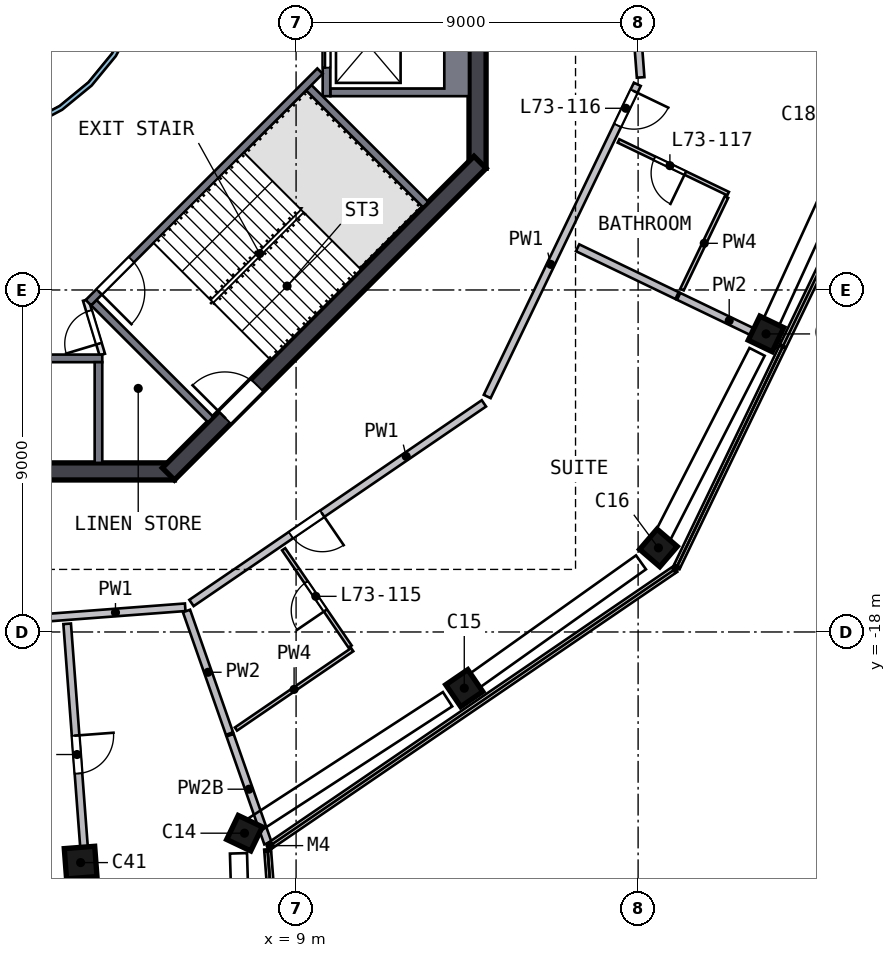
"""IFC4 building model, lengths in metres.
Left out: names, types, materials, properties, quantities, classifications, styles, units other than length and angle.
Written with IfcOpenShell. Run it as: python <this file> out.ifc"""

import sys

from ifc_helpers import new_model, si_unit, direction, frame, frame_2d, origin, origin_2d, place, context, subcontext, project, spatial, polyline, rectangle, outline, extrude, element, fill, save


model = new_model("IFC4")
c1 = context("Model", 3, precision=1e-05, world=origin(), true_north=direction((0.0, 1.0)))
c2 = subcontext(c1, "Body", "Model", "MODEL_VIEW")
j1 = project(units=[si_unit("LENGTHUNIT", "METRE"), si_unit("PLANEANGLEUNIT", "RADIAN")], contexts=[c1])
p1 = place(None, origin())
s1 = spatial("IfcSite", under=j1, at=p1, CompositionType="ELEMENT")
p2 = place(p1, origin())
s2 = spatial("IfcBuilding", under=s1, at=p2, CompositionType="ELEMENT")
p3 = place(p2, frame((0.0, 0.0, 295.0)))
s3 = spatial("IfcBuildingStorey", under=s2, at=p3, CompositionType="ELEMENT", Elevation=295.0)
p4 = place(p3, frame((7.539, -23.33, 0.0), z_axis=(0.086228285, 0.028723419, 0.995861259), x_axis=(-0.42819106, -0.901484173, 0.063076948)))
e1 = element("IfcColumn", 1, at=p4, inside=s3, PredefinedType="COLUMN", context=c2, shape_type="SweptSolid", body=[
    extrude(rectangle(XDim=0.7, YDim=0.7, at=origin_2d()), origin(), (0.0, 0.0, 1.0), 4.207),
])
p5 = place(p3, frame((13.339, -19.54, 0.0), z_axis=(0.072089807, 0.050091388, 0.996139505), x_axis=(0.822815086, 0.561488906, -0.087781218)))
e2 = element("IfcColumn", 2, at=p5, inside=s3, PredefinedType="COLUMN", context=c2, shape_type="SweptSolid", body=[
    extrude(rectangle(XDim=0.7, YDim=0.7, at=origin_2d()), origin(), (0.0, 0.0, 1.0), 4.206),
])
p6 = place(p3, frame((18.465, -15.871, 0.0), z_axis=(0.05826254, 0.068940137, 0.995918036), x_axis=(-0.649248608, -0.755201666, 0.090259013)))
e3 = element("IfcColumn", 3, at=p6, inside=s3, PredefinedType="COLUMN", context=c2, shape_type="SweptSolid", body=[
    extrude(rectangle(XDim=0.7, YDim=0.7, at=origin_2d()), origin(), (0.0, 0.0, 1.0), 4.207),
])
p7 = place(p3, frame((21.322, -10.252, 0.0), z_axis=(0.037379974, 0.079403422, 0.996141473), x_axis=(0.43187559, 0.897653527, -0.08775888)))
e4 = element("IfcColumn", 4, at=p7, inside=s3, PredefinedType="COLUMN", context=c2, shape_type="SweptSolid", body=[
    extrude(rectangle(XDim=0.7, YDim=0.7, at=origin_2d()), origin(), (0.0, 0.0, 1.0), 4.206),
])
p8 = place(p3, frame((3.223, -24.084, 0.0), z_axis=(0.089194109, 0.012708855, 0.995933178), x_axis=(0.075965993, -0.997092833, 0.005920266)))
e5 = element("IfcColumn", 5, at=p8, inside=s3, PredefinedType="COLUMN", context=c2, shape_type="SweptSolid", body=[
    extrude(rectangle(XDim=0.8, YDim=0.8, at=origin_2d()), origin(), (0.0, 0.0, 1.0), 4.207),
])
p9 = place(p3, frame((13.775, -5.799, 0.0), z_axis=(0.0, 0.0, 1.0), x_axis=(0.0, 1.0, 0.0)))
e6 = element("IfcWall", 6, at=p9, inside=s3, PredefinedType="SHEAR", context=c2, shape_type="SweptSolid", body=[
    extrude(rectangle(XDim=11.598, YDim=0.45, at=frame_2d((5.799, 0.0))), origin(), (0.0, 0.0, 1.0), 4.5),
])
p10 = place(p9, frame((4.899, 0.0, 0.0)))
e7 = element("IfcOpeningElement", 7, at=p10, cuts=e6, PredefinedType="OPENING", context=c2, shape_type="SweptSolid", body=[
    extrude(rectangle(XDim=1.8, YDim=2.1, at=frame_2d((0.9, 1.05))), frame((0.0, 0.235, 0.0), z_axis=(0.0, -1.0, 0.0), x_axis=(1.0, 0.0, 0.0)), (0.0, 0.0, 1.0), 0.47),
])
p11 = place(p3, frame((-5.799, -13.775, 0.0), z_axis=(0.0, 0.0, 1.0), x_axis=(1.0, 0.0, 0.0)))
e8 = element("IfcWall", 8, at=p11, inside=s3, PredefinedType="SHEAR", context=c2, shape_type="SweptSolid", body=[
    extrude(rectangle(XDim=11.598, YDim=0.45, at=frame_2d((5.799, 0.0))), origin(), (0.0, 0.0, 1.0), 4.5),
])
p12 = place(p3, frame((5.64, -13.841, 0.0), z_axis=(0.0, 0.0, 1.0), x_axis=(0.707106781, 0.707106781, 0.0)))
e9 = element("IfcWall", 9, at=p12, inside=s3, PredefinedType="SHEAR", context=c2, shape_type="SweptSolid", body=[
    extrude(rectangle(XDim=11.598, YDim=0.45, at=frame_2d((5.799, 0.0))), origin(), (0.0, 0.0, 1.0), 4.5),
])
p13 = place(p12, frame((2.099, 0.0, 0.0)))
e10 = element("IfcOpeningElement", 10, at=p13, cuts=e9, PredefinedType="OPENING", context=c2, shape_type="SweptSolid", body=[
    extrude(rectangle(XDim=1.2, YDim=2.1, at=frame_2d((0.6, 1.05))), frame((0.0, 0.235, 0.0), z_axis=(0.0, -1.0, 0.0), x_axis=(1.0, 0.0, 0.0)), (0.0, 0.0, 1.0), 0.47),
])
p14 = place(p3, origin())
e11 = element("IfcWall", 11, at=p14, inside=s3, PredefinedType="SOLIDWALL", context=c2, shape_type="SweptSolid", body=[
    extrude(outline(polyline([(13.55, -3.9), (9.9, -3.9), (9.9, -3.7), (12.9, -3.7), (12.9, -1.4), (9.9, -1.4), (9.9, -1.2), (13.55, -1.2), (13.55, -3.9)])), origin(), (0.0, 0.0, 1.0), 4.19),
])
p15 = place(p3, frame((9.8, -1.2, 0.0), z_axis=(0.0, 0.0, 1.0), x_axis=(0.0, -1.0, 0.0)))
e12 = element("IfcWall", 12, at=p15, inside=s3, PredefinedType="SOLIDWALL", context=c2, shape_type="SweptSolid", body=[
    extrude(rectangle(XDim=2.7, YDim=0.2, at=frame_2d((1.35, 0.0))), origin(), (0.0, 0.0, 1.0), 4.19),
])
p16 = place(p15, frame((0.75, 0.0, 0.0)))
e13 = element("IfcOpeningElement", 13, at=p16, cuts=e12, PredefinedType="OPENING", context=c2, shape_type="SweptSolid", body=[
    extrude(rectangle(XDim=1.2, YDim=2.1, at=frame_2d((0.6, 1.05))), frame((0.0, 0.11, 0.0), z_axis=(0.0, -1.0, 0.0), x_axis=(1.0, 0.0, 0.0)), (0.0, 0.0, 1.0), 0.22),
])
p17 = place(p3, frame((-3.9, -10.8, 0.0), z_axis=(0.0, 0.0, 1.0), x_axis=(1.0, 0.0, 0.0)))
e14 = element("IfcWall", 14, at=p17, inside=s3, PredefinedType="SOLIDWALL", context=c2, shape_type="SweptSolid", body=[
    extrude(rectangle(XDim=7.8, YDim=0.2, at=frame_2d((3.9, 0.0))), origin(), (0.0, 0.0, 1.0), 4.19),
])
p18 = place(p17, frame((3.45, 0.0, 0.0)))
e15 = element("IfcOpeningElement", 15, at=p18, cuts=e14, PredefinedType="OPENING", context=c2, shape_type="SweptSolid", body=[
    extrude(rectangle(XDim=0.9, YDim=2.1, at=frame_2d((0.45, 1.05))), frame((0.0, 0.11, 0.0), z_axis=(0.0, -1.0, 0.0), x_axis=(1.0, 0.0, 0.0)), (0.0, 0.0, 1.0), 0.22),
])
p19 = place(p3, frame((3.8, -10.9, 0.0), z_axis=(0.0, 0.0, 1.0), x_axis=(0.0, -1.0, 0.0)))
e16 = element("IfcWall", 16, at=p19, inside=s3, PredefinedType="SOLIDWALL", context=c2, shape_type="SweptSolid", body=[
    extrude(rectangle(XDim=2.65, YDim=0.2, at=frame_2d((1.325, 0.0))), origin(), (0.0, 0.0, 1.0), 4.19),
])
p20 = place(p3, frame((9.629, -3.24, 0.0), z_axis=(0.0, 0.0, 1.0), x_axis=(-0.707120946, -0.707092617, 0.0)))
e17 = element("IfcWall", 17, at=p20, inside=s3, PredefinedType="SOLIDWALL", context=c2, shape_type="SweptSolid", body=[
    extrude(rectangle(XDim=8.618, YDim=0.2, at=frame_2d((4.309, 0.0))), origin(), (0.0, 0.0, 1.0), 4.19),
])
p21 = place(p20, frame((7.018, 0.0, 0.0)))
e18 = element("IfcOpeningElement", 18, at=p21, cuts=e17, PredefinedType="OPENING", context=c2, shape_type="SweptSolid", body=[
    extrude(rectangle(XDim=1.2, YDim=2.1, at=frame_2d((0.6, 1.05))), frame((0.0, 0.11, 0.0), z_axis=(0.0, -1.0, 0.0), x_axis=(1.0, 0.0, 0.0)), (0.0, 0.0, 1.0), 0.22),
])
for number, where, z_axis, x_axis in (
    (19, (3.677, -9.334, 0.0), (0.0, 0.0, 1.0), (0.707, -0.707, 0.0)),
    (20, (9.334, -3.677, 0.0), (0.0, 0.0, 1.0), (0.707, -0.707, 0.0)),
):
    element("IfcWall", number, at=place(p3, frame(where, z_axis=z_axis, x_axis=x_axis)), inside=s3, PredefinedType="SOLIDWALL", context=c2, shape_type="SweptSolid", body=[
        extrude(rectangle(XDim=4.35, YDim=0.2, at=frame_2d((2.175, 0.0))), origin(), (0.0, 0.0, 1.0), 4.19),
    ])
p22 = place(p3, frame((3.9, -10.7, 0.0), z_axis=(0.0, 0.0, 1.0), x_axis=(-0.289808785, 0.957084567, 0.0)))
e21 = element("IfcWall", 21, at=p22, inside=s3, PredefinedType="PARTITIONING", context=c2, shape_type="SweptSolid", body=[
    extrude(rectangle(XDim=1.501, YDim=0.15, at=frame_2d((0.75, 0.0))), origin(), (0.0, 0.0, 1.0), 4.19),
])
p23 = place(p22, frame((0.301, 0.0, 0.0)))
e22 = element("IfcOpeningElement", 22, at=p23, cuts=e21, PredefinedType="OPENING", context=c2, shape_type="SweptSolid", body=[
    extrude(rectangle(XDim=0.9, YDim=2.1, at=frame_2d((0.45, 1.05))), frame((0.0, 0.085, 0.0), z_axis=(0.0, -1.0, 0.0), x_axis=(1.0, 0.0, 0.0)), (0.0, 0.0, 1.0), 0.17),
])
p24 = place(p3, origin())
e23 = element("IfcWall", 23, at=p24, inside=s3, PredefinedType="SOLIDWALL", context=c2, shape_type="SweptSolid", body=[
    extrude(outline(polyline([(5.021, -0.999), (4.73, -1.959), (4.257, -2.844), (3.62, -3.62), (2.844, -4.257), (1.959, -4.73), (0.999, -5.021), (0.0, -5.12), (-0.999, -5.021), (-1.959, -4.73), (-2.844, -4.257), (-3.62, -3.62), (-4.257, -2.844), (-4.73, -1.959), (-5.021, -0.999), (-5.12, 0.0), (-5.021, 0.999), (-4.73, 1.959), (-4.257, 2.844), (-3.62, 3.62), (-2.844, 4.257), (-1.959, 4.73), (-0.999, 5.021), (0.0, 5.12), (0.999, 5.021), (1.959, 4.73), (2.844, 4.257), (3.62, 3.62), (4.257, 2.844), (4.73, 1.959), (5.021, 0.999), (5.12, 0.0), (5.021, -0.999)]), holes=[polyline([(4.904, 0.976), (4.619, 1.913), (4.157, 2.778), (3.535, 3.535), (2.778, 4.157), (1.913, 4.619), (0.976, 4.904), (0.0, 5.0), (-0.976, 4.904), (-1.913, 4.619), (-2.778, 4.157), (-3.535, 3.535), (-4.157, 2.778), (-4.619, 1.913), (-4.904, 0.976), (-5.0, 0.0), (-4.904, -0.976), (-4.619, -1.913), (-4.157, -2.778), (-3.535, -3.535), (-2.778, -4.157), (-1.913, -4.619), (-0.976, -4.904), (0.0, -5.0), (0.976, -4.904), (1.913, -4.619), (2.778, -4.157), (3.535, -3.535), (4.157, -2.778), (4.619, -1.913), (4.904, -0.976), (5.0, 0.0), (4.904, 0.976)])]), origin(), (0.0, 0.0, 1.0), 4.19),
])
p25 = place(p3, frame((6.083, -17.349, 0.0), z_axis=(0.0, 0.0, 1.0), x_axis=(-0.997157396, -0.07534671, 0.0)))
e24 = element("IfcWall", 24, at=p25, inside=s3, PredefinedType="SOLIDWALL", context=c2, shape_type="SweptSolid", body=[
    extrude(rectangle(XDim=9.517, YDim=0.2, at=frame_2d((4.758, 0.0))), origin(), (0.0, 0.0, 1.0), 4.19),
])
p26 = place(p25, frame((3.881, 0.0, 0.0)))
e25 = element("IfcOpeningElement", 25, at=p26, cuts=e24, PredefinedType="OPENING", context=c2, shape_type="SweptSolid", body=[
    extrude(rectangle(XDim=1.8, YDim=2.1, at=frame_2d((0.9, 1.05))), frame((0.0, 0.11, 0.0), z_axis=(0.0, -1.0, 0.0), x_axis=(1.0, 0.0, 0.0)), (0.0, 0.0, 1.0), 0.22),
])
p27 = place(p3, frame((13.942, -11.984, 0.0), z_axis=(0.0, 0.0, 1.0), x_axis=(-0.825891763, -0.563828694, 0.0)))
e26 = element("IfcWall", 26, at=p27, inside=s3, PredefinedType="SOLIDWALL", context=c2, shape_type="SweptSolid", body=[
    extrude(rectangle(XDim=9.316, YDim=0.2, at=frame_2d((4.658, 0.0))), origin(), (0.0, 0.0, 1.0), 4.19),
])
p28 = place(p27, frame((5.15, 0.0, 0.0)))
e27 = element("IfcOpeningElement", 27, at=p28, cuts=e26, PredefinedType="OPENING", context=c2, shape_type="SweptSolid", body=[
    extrude(rectangle(XDim=1.0, YDim=2.1, at=frame_2d((0.5, 1.05))), frame((0.0, 0.11, 0.0), z_axis=(0.0, -1.0, 0.0), x_axis=(1.0, 0.0, 0.0)), (0.0, 0.0, 1.0), 0.22),
])
p29 = place(p3, frame((17.979, -3.588, 0.0), z_axis=(0.0, 0.0, 1.0), x_axis=(-0.433350913, -0.90122527, 0.0)))
e28 = element("IfcWall", 28, at=p29, inside=s3, PredefinedType="SOLIDWALL", context=c2, shape_type="SweptSolid", body=[
    extrude(rectangle(XDim=9.115, YDim=0.2, at=frame_2d((4.558, 0.0))), origin(), (0.0, 0.0, 1.0), 4.19),
])
p30 = place(p29, frame((0.2, 0.0, 0.0)))
e29 = element("IfcOpeningElement", 29, at=p30, cuts=e28, PredefinedType="OPENING", context=c2, shape_type="SweptSolid", body=[
    extrude(rectangle(XDim=1.0, YDim=2.1, at=frame_2d((0.5, 1.05))), frame((0.0, 0.11, 0.0), z_axis=(0.0, -1.0, 0.0), x_axis=(1.0, 0.0, 0.0)), (0.0, 0.0, 1.0), 0.22),
])
p31 = place(p3, frame((18.066, -3.406, 0.0), z_axis=(0.0, 0.0, 1.0), x_axis=(-0.075325055, 0.997159032, 0.0)))
e30 = element("IfcWall", 30, at=p31, inside=s3, PredefinedType="SOLIDWALL", context=c2, shape_type="SweptSolid", body=[
    extrude(rectangle(XDim=9.516, YDim=0.2, at=frame_2d((4.758, 0.0))), origin(), (0.0, 0.0, 1.0), 4.19),
])
p32 = place(p3, frame((2.976, -17.785, 0.0), z_axis=(0.0, 0.0, 1.0), x_axis=(0.07531369, -0.997159891, 0.0)))
e31 = element("IfcWall", 31, at=p32, inside=s3, PredefinedType="SOLIDWALL", context=c2, shape_type="SweptSolid", body=[
    extrude(rectangle(XDim=10.302, YDim=0.2, at=frame_2d((5.151, 0.0))), origin(), (0.0, 0.0, 1.0), 4.19),
])
p33 = place(p32, frame((2.95, 0.0, 0.0)))
e32 = element("IfcOpeningElement", 32, at=p33, cuts=e31, PredefinedType="OPENING", context=c2, shape_type="SweptSolid", body=[
    extrude(rectangle(XDim=1.0, YDim=2.1, at=frame_2d((0.5, 1.05))), frame((0.0, 0.11, 0.0), z_axis=(0.0, -1.0, 0.0), x_axis=(1.0, 0.0, 0.0)), (0.0, 0.0, 1.0), 0.22),
])
p34 = place(p3, frame((6.117, -17.447, 0.0), z_axis=(0.0, 0.0, 1.0), x_axis=(0.330865709, -0.943677849, 0.0)))
e33 = element("IfcWall", 33, at=p34, inside=s3, PredefinedType="SOLIDWALL", context=c2, shape_type="SweptSolid", body=[
    extrude(rectangle(XDim=3.419, YDim=0.2, at=frame_2d((1.709, 0.0))), origin(), (0.0, 0.0, 1.0), 4.19),
])
p35 = place(p3, frame((7.263, -20.716, 0.0), z_axis=(0.0, 0.0, 1.0), x_axis=(0.330855951, -0.94368127, 0.0)))
e34 = element("IfcWall", 34, at=p35, inside=s3, PredefinedType="SOLIDWALL", context=c2, shape_type="SweptSolid", body=[
    extrude(rectangle(XDim=3.011, YDim=0.2, at=frame_2d((1.506, 0.0))), origin(), (0.0, 0.0, 1.0), 3.69),
])
p36 = place(p3, frame((16.407, -7.889, 0.0), z_axis=(0.0, 0.0, 1.0), x_axis=(0.901246112, -0.433307565, 0.0)))
e35 = element("IfcWall", 35, at=p36, inside=s3, PredefinedType="SOLIDWALL", context=c2, shape_type="SweptSolid", body=[
    extrude(rectangle(XDim=2.905, YDim=0.2, at=frame_2d((1.452, 0.0))), origin(), (0.0, 0.0, 1.0), 4.19),
])
p37 = place(p3, frame((19.067, -9.168, 0.0), z_axis=(0.0, 0.0, 1.0), x_axis=(0.901218262, -0.433365485, 0.0)))
e36 = element("IfcWall", 36, at=p37, inside=s3, PredefinedType="SOLIDWALL", context=c2, shape_type="SweptSolid", body=[
    extrude(rectangle(XDim=2.952, YDim=0.2, at=frame_2d((1.476, 0.0))), origin(), (0.0, 0.0, 1.0), 4.19),
])
p38 = place(p3, frame((10.477, -18.466, 0.0), z_axis=(0.0, 0.0, 1.0), x_axis=(-0.82591626, -0.563792809, 0.0)))
e37 = element("IfcWall", 37, at=p38, inside=s3, PredefinedType="PARTITIONING", context=c2, shape_type="SweptSolid", body=[
    extrude(rectangle(XDim=3.704, YDim=0.1, at=frame_2d((1.852, 0.0))), origin(), (0.0, 0.0, 1.0), 4.19),
])
p39 = place(p3, frame((10.421, -18.384, 0.0), z_axis=(0.0, 0.0, 1.0), x_axis=(-0.563808375, 0.825905634, 0.0)))
e38 = element("IfcWall", 38, at=p39, inside=s3, PredefinedType="PARTITIONING", context=c2, shape_type="SweptSolid", body=[
    extrude(rectangle(XDim=3.1, YDim=0.1, at=frame_2d((1.55, 0.0))), origin(), (0.0, 0.0, 1.0), 4.19),
])
p40 = place(p39, frame((1.15, 0.0, 0.0)))
e39 = element("IfcOpeningElement", 39, at=p40, cuts=e38, PredefinedType="OPENING", context=c2, shape_type="SweptSolid", body=[
    extrude(rectangle(XDim=0.9, YDim=2.1, at=frame_2d((0.45, 1.05))), frame((0.0, 0.06, 0.0), z_axis=(0.0, -1.0, 0.0), x_axis=(1.0, 0.0, 0.0)), (0.0, 0.0, 1.0), 0.12),
])
p41 = place(p3, frame((20.368, -6.465, 0.0), z_axis=(0.0, 0.0, 1.0), x_axis=(-0.901247841, 0.433303969, 0.0)))
e40 = element("IfcWall", 40, at=p41, inside=s3, PredefinedType="PARTITIONING", context=c2, shape_type="SweptSolid", body=[
    extrude(rectangle(XDim=3.2, YDim=0.1, at=frame_2d((1.6, 0.0))), origin(), (0.0, 0.0, 1.0), 4.19),
])
p42 = place(p41, frame((1.25, 0.0, 0.0)))
e41 = element("IfcOpeningElement", 41, at=p42, cuts=e40, PredefinedType="OPENING", context=c2, shape_type="SweptSolid", body=[
    extrude(rectangle(XDim=0.9, YDim=2.1, at=frame_2d((0.45, 1.05))), frame((0.0, 0.06, 0.0), z_axis=(0.0, -1.0, 0.0), x_axis=(1.0, 0.0, 0.0)), (0.0, 0.0, 1.0), 0.12),
])
p43 = place(p3, frame((20.325, -6.555, 0.0), z_axis=(0.0, 0.0, 1.0), x_axis=(-0.433342461, -0.901229333, 0.0)))
e42 = element("IfcWall", 42, at=p43, inside=s3, PredefinedType="PARTITIONING", context=c2, shape_type="SweptSolid", body=[
    extrude(rectangle(XDim=2.7, YDim=0.1, at=frame_2d((1.35, 0.0))), origin(), (0.0, 0.0, 1.0), 4.19),
])
p44 = place(p16, origin())
e43 = element("IfcDoor", 43, at=p44, inside=s3, OperationType="DOUBLE_DOOR_SLIDING", PredefinedType="DOOR", context=c2, shape_type="SweptSolid", body=[
    extrude(rectangle(XDim=1.2, YDim=2.1, at=frame_2d((0.6, 1.05))), frame((0.0, 0.025, 0.0), z_axis=(0.0, -1.0, 0.0), x_axis=(1.0, 0.0, 0.0)), (0.0, 0.0, 1.0), 0.05),
])
fill(e13, e43)
p45 = place(p21, origin())
e44 = element("IfcDoor", 44, at=p45, inside=s3, OperationType="SINGLE_SWING_RIGHT", PredefinedType="DOOR", context=c2, shape_type="SweptSolid", body=[
    extrude(rectangle(XDim=1.2, YDim=2.1, at=frame_2d((0.6, 1.05))), frame((0.0, 0.025, 0.0), z_axis=(0.0, -1.0, 0.0), x_axis=(1.0, 0.0, 0.0)), (0.0, 0.0, 1.0), 0.05),
])
fill(e18, e44)
p46 = place(p13, origin())
e45 = element("IfcDoor", 45, at=p46, inside=s3, OperationType="SINGLE_SWING_LEFT", PredefinedType="DOOR", context=c2, shape_type="SweptSolid", body=[
    extrude(rectangle(XDim=1.2, YDim=2.1, at=frame_2d((0.6, 1.05))), frame((0.0, 0.025, 0.0), z_axis=(0.0, -1.0, 0.0), x_axis=(1.0, 0.0, 0.0)), (0.0, 0.0, 1.0), 0.05),
])
fill(e10, e45)
p47 = place(p23, origin())
e46 = element("IfcDoor", 46, at=p47, inside=s3, OperationType="SINGLE_SWING_LEFT", PredefinedType="DOOR", context=c2, shape_type="SweptSolid", body=[
    extrude(rectangle(XDim=0.9, YDim=2.1, at=frame_2d((0.45, 1.05))), frame((0.0, 0.025, 0.0), z_axis=(0.0, -1.0, 0.0), x_axis=(1.0, 0.0, 0.0)), (0.0, 0.0, 1.0), 0.05),
])
fill(e22, e46)
p48 = place(p33, origin())
e47 = element("IfcDoor", 47, at=p48, inside=s3, OperationType="SINGLE_SWING_LEFT", PredefinedType="DOOR", context=c2, shape_type="SweptSolid", body=[
    extrude(rectangle(XDim=1.0, YDim=2.1, at=frame_2d((0.5, 1.05))), frame((0.0, 0.025, 0.0), z_axis=(0.0, -1.0, 0.0), x_axis=(1.0, 0.0, 0.0)), (0.0, 0.0, 1.0), 0.05),
])
fill(e32, e47)
p49 = place(p28, origin())
e48 = element("IfcDoor", 48, at=p49, inside=s3, OperationType="SINGLE_SWING_LEFT", PredefinedType="DOOR", context=c2, shape_type="SweptSolid", body=[
    extrude(rectangle(XDim=1.0, YDim=2.1, at=frame_2d((0.5, 1.05))), frame((0.0, 0.025, 0.0), z_axis=(0.0, -1.0, 0.0), x_axis=(1.0, 0.0, 0.0)), (0.0, 0.0, 1.0), 0.05),
])
fill(e27, e48)
p50 = place(p40, origin())
e49 = element("IfcDoor", 49, at=p50, inside=s3, OperationType="SINGLE_SWING_LEFT", PredefinedType="DOOR", context=c2, shape_type="SweptSolid", body=[
    extrude(rectangle(XDim=0.9, YDim=2.1, at=frame_2d((0.45, 1.05))), frame((0.0, 0.025, 0.0), z_axis=(0.0, -1.0, 0.0), x_axis=(1.0, 0.0, 0.0)), (0.0, 0.0, 1.0), 0.05),
])
fill(e39, e49)
p51 = place(p30, origin())
e50 = element("IfcDoor", 50, at=p51, inside=s3, OperationType="SINGLE_SWING_LEFT", PredefinedType="DOOR", context=c2, shape_type="SweptSolid", body=[
    extrude(rectangle(XDim=1.0, YDim=2.1, at=frame_2d((0.5, 1.05))), frame((0.0, 0.025, 0.0), z_axis=(0.0, -1.0, 0.0), x_axis=(1.0, 0.0, 0.0)), (0.0, 0.0, 1.0), 0.05),
])
fill(e29, e50)
p52 = place(p42, origin())
e51 = element("IfcDoor", 51, at=p52, inside=s3, OperationType="SINGLE_SWING_LEFT", PredefinedType="DOOR", context=c2, shape_type="SweptSolid", body=[
    extrude(rectangle(XDim=0.9, YDim=2.1, at=frame_2d((0.45, 1.05))), frame((0.0, 0.025, 0.0), z_axis=(0.0, -1.0, 0.0), x_axis=(1.0, 0.0, 0.0)), (0.0, 0.0, 1.0), 0.05),
])
fill(e41, e51)
save(model, sys.argv[1])
